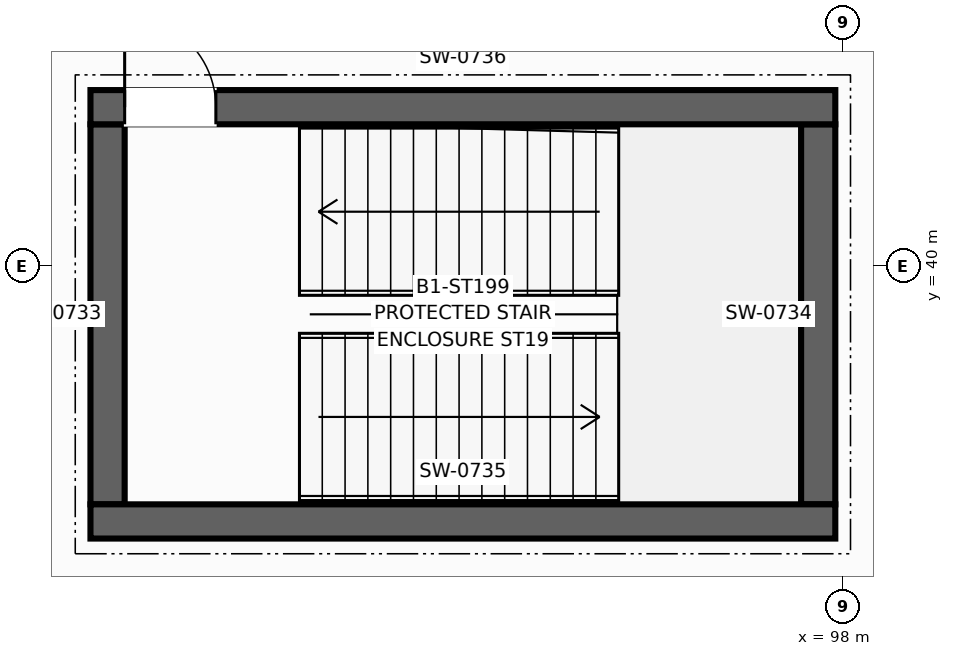
"""IFC4 building model, lengths in metres.
Left out: names, types, materials, properties, quantities, classifications, styles, units other than length and angle.
Written with IfcOpenShell. Run it as: python <this file> out.ifc"""

import sys

from ifc_helpers import new_model, si_unit, direction, frame, frame_2d, origin, place, context, subcontext, project, spatial, rectangle, extrude, element, fill, save


model = new_model("IFC4")
c1 = context("Model", 3, precision=1e-05, world=origin(), true_north=direction((0.0, 1.0)))
c2 = subcontext(c1, "Body", "Model", "MODEL_VIEW")
j1 = project(units=[si_unit("LENGTHUNIT", "METRE"), si_unit("PLANEANGLEUNIT", "RADIAN")], contexts=[c1])
p1 = place(None, origin())
s1 = spatial("IfcSite", under=j1, at=p1, CompositionType="ELEMENT")
p2 = place(p1, origin())
s2 = spatial("IfcBuilding", under=s1, at=p2, CompositionType="ELEMENT")
p3 = place(p2, frame((0.0, 0.0, -4.5)))
s3 = spatial("IfcBuildingStorey", under=s2, at=p3, CompositionType="ELEMENT", Elevation=-4.5)
for number, where, z_axis, x_axis in (
    (1, (88.325, 36.86, 0.0), (0.0, 0.0, 1.0), (0.0, 1.0, 0.0)),
    (2, (97.675, 36.86, 0.0), (0.0, 0.0, 1.0), (0.0, 1.0, 0.0)),
):
    element("IfcWall", number, at=place(p3, frame(where, z_axis=z_axis, x_axis=x_axis)), inside=s3, PredefinedType="SHEAR", context=c2, shape_type="SweptSolid", body=[
        extrude(rectangle(XDim=5.0, YDim=0.45, at=frame_2d((2.5, 0.0))), origin(), (0.0, 0.0, 1.0), 4.225),
    ])
p4 = place(p3, frame((88.1, 36.635, 0.0), z_axis=(0.0, 0.0, 1.0), x_axis=(1.0, 0.0, 0.0)))
e3 = element("IfcWall", 3, at=p4, inside=s3, PredefinedType="SHEAR", context=c2, shape_type="SweptSolid", body=[
    extrude(rectangle(XDim=9.8, YDim=0.45, at=frame_2d((4.9, 0.0))), origin(), (0.0, 0.0, 1.0), 4.225),
])
p5 = place(p3, frame((88.1, 42.085, 0.0), z_axis=(0.0, 0.0, 1.0), x_axis=(1.0, 0.0, 0.0)))
e4 = element("IfcWall", 4, at=p5, inside=s3, PredefinedType="SHEAR", context=c2, shape_type="SweptSolid", body=[
    extrude(rectangle(XDim=9.8, YDim=0.45, at=frame_2d((4.9, 0.0))), origin(), (0.0, 0.0, 1.0), 4.225),
])
p6 = place(p5, frame((0.45, 0.0, 0.0)))
e5 = element("IfcOpeningElement", 5, at=p6, cuts=e4, PredefinedType="OPENING", context=c2, shape_type="SweptSolid", body=[
    extrude(rectangle(XDim=1.2, YDim=2.2, at=frame_2d((0.6, 1.1))), frame((0.0, 0.235, 0.0), z_axis=(0.0, -1.0, 0.0), x_axis=(1.0, 0.0, 0.0)), (0.0, 0.0, 1.0), 0.47),
])
p7 = place(p6, origin())
e6 = element("IfcDoor", 6, at=p7, inside=s3, OperationType="SINGLE_SWING_LEFT", PredefinedType="DOOR", context=c2, shape_type="SweptSolid", body=[
    extrude(rectangle(XDim=1.2, YDim=2.2, at=frame_2d((0.6, 1.1))), frame((0.0, 0.025, 0.0), z_axis=(0.0, -1.0, 0.0), x_axis=(1.0, 0.0, 0.0)), (0.0, 0.0, 1.0), 0.05),
])
fill(e5, e6)
save(model, sys.argv[1])
